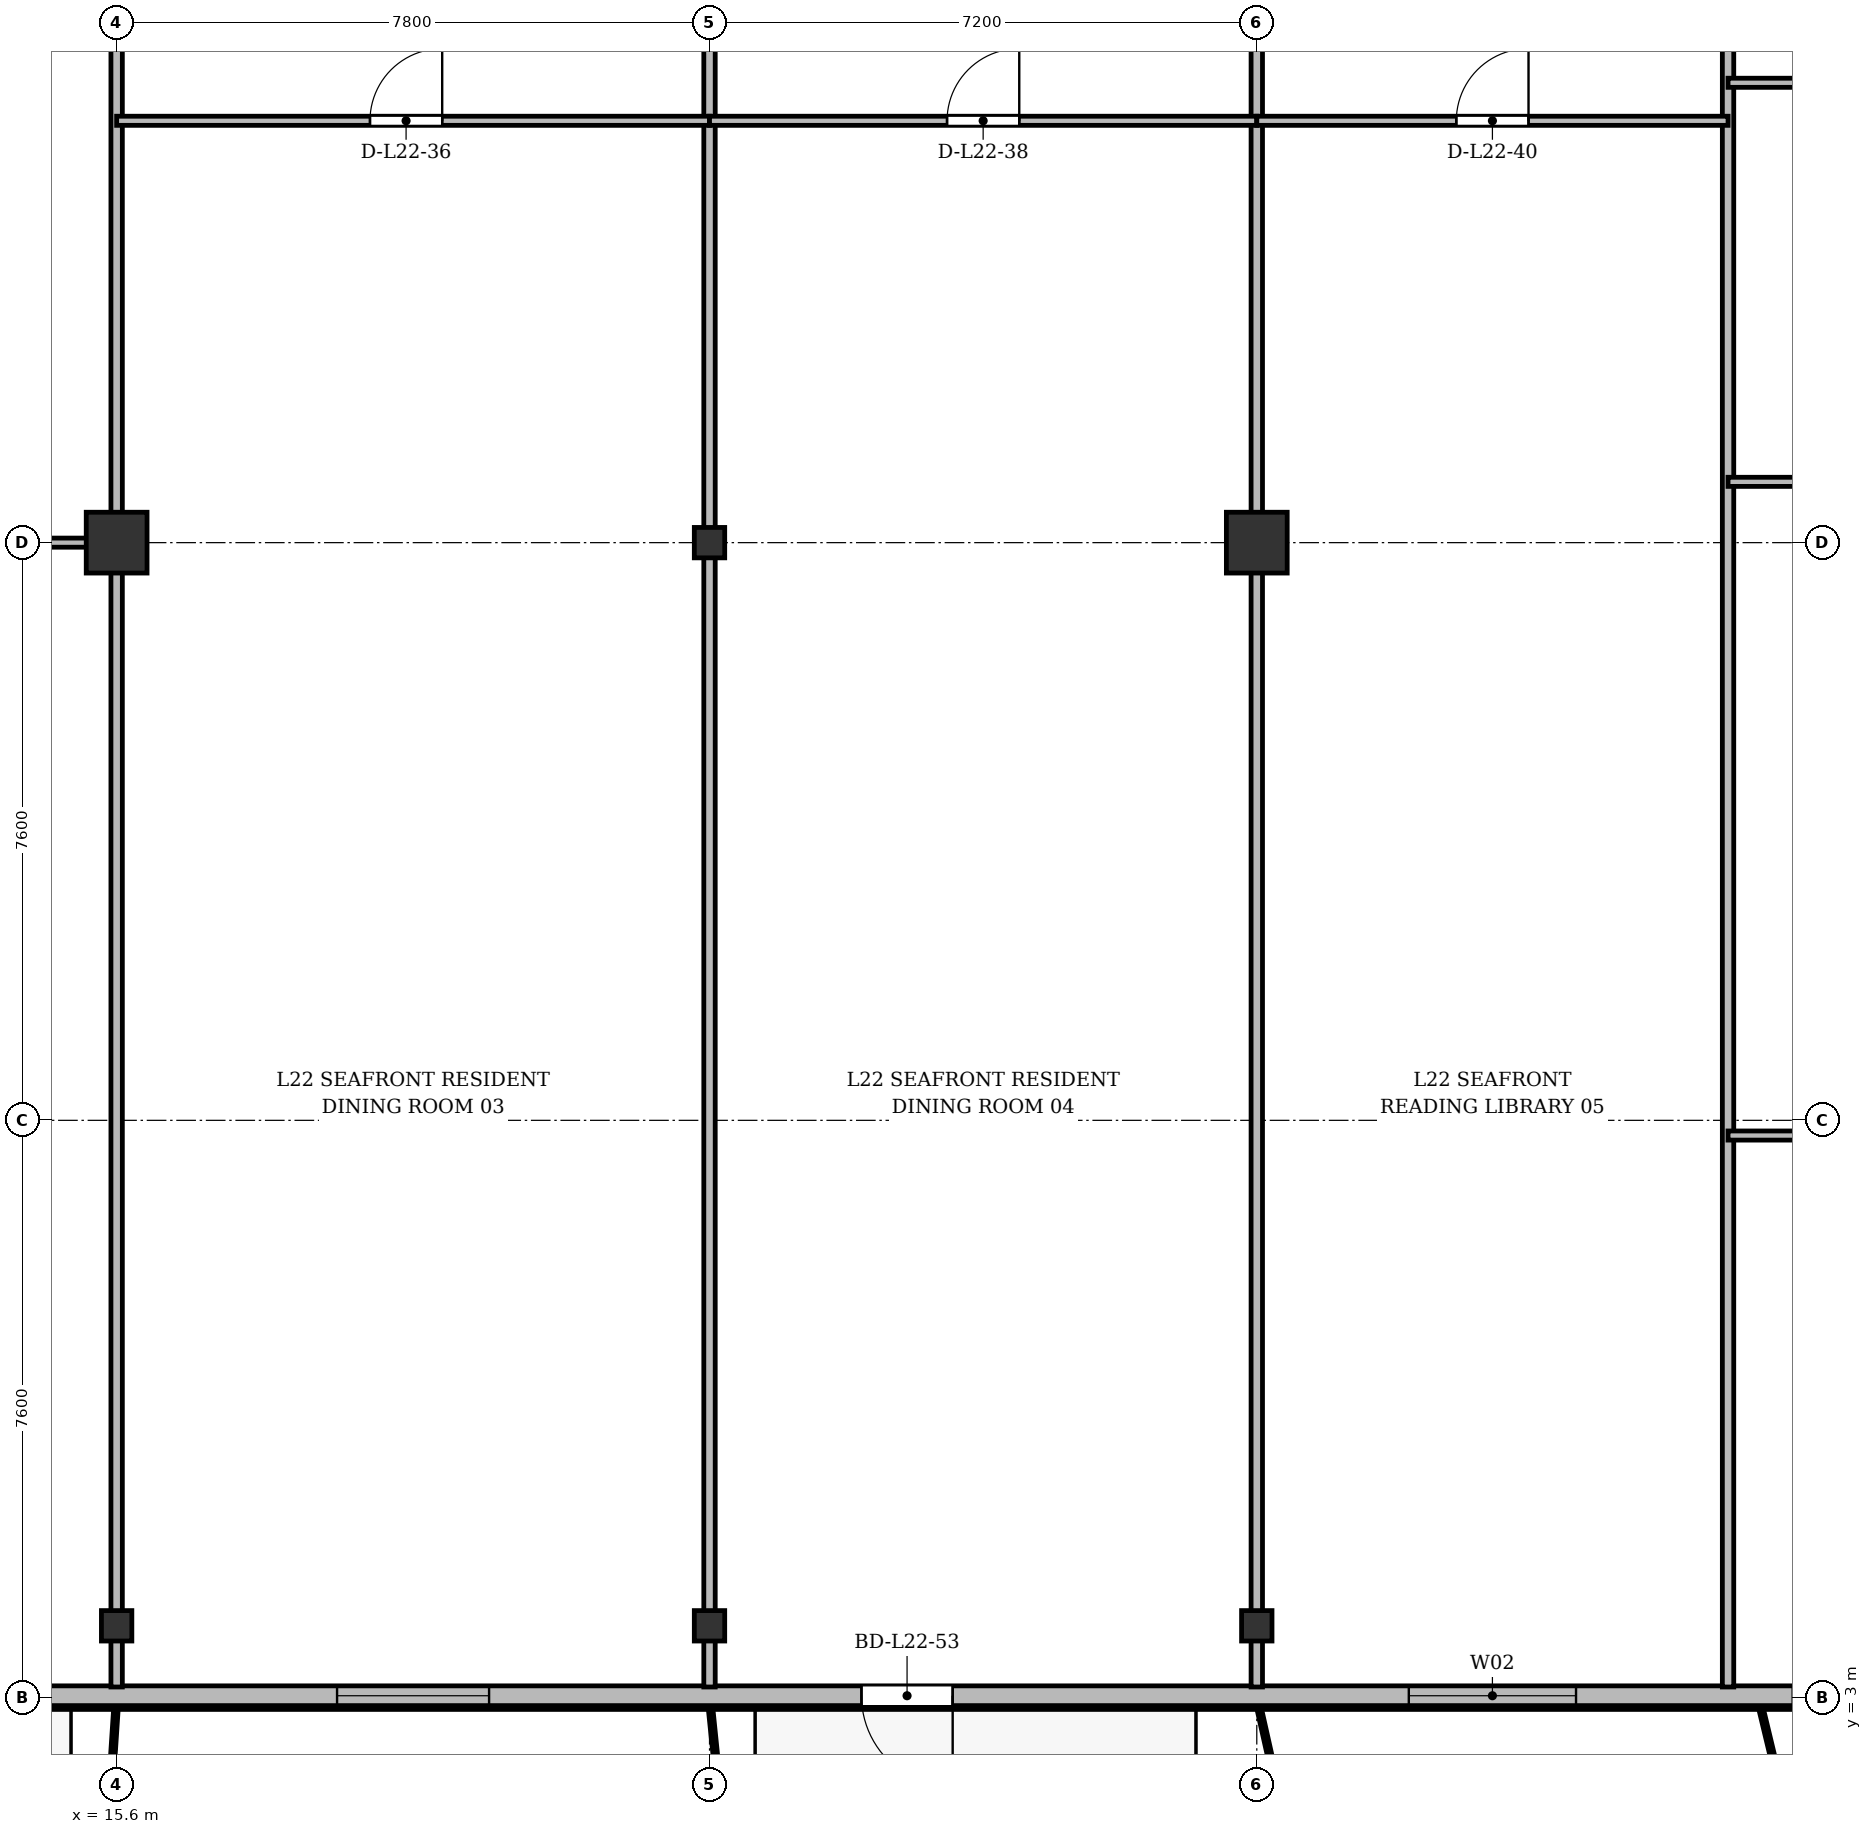
"""IFC4 building model, lengths in metres.
Left out: names, types, materials, properties, quantities, classifications, styles, units other than length and angle.
Written with IfcOpenShell. Run it as: python <this file> out.ifc"""

import sys

from ifc_helpers import new_model, si_unit, direction, frame, frame_2d, origin, origin_2d, place, context, subcontext, project, spatial, rectangle, i_section, extrude, source, transform, mapped, element, fill, save


model = new_model("IFC4")
c1 = context("Model", 3, precision=1e-05, world=origin(), true_north=direction((0.0, 1.0)))
c2 = subcontext(c1, "Body", "Model", "MODEL_VIEW")
j1 = project(units=[si_unit("LENGTHUNIT", "METRE"), si_unit("PLANEANGLEUNIT", "RADIAN")], contexts=[c1])
p1 = place(None, origin())
s1 = spatial("IfcSite", under=j1, at=p1, CompositionType="ELEMENT")
p2 = place(p1, origin())
s2 = spatial("IfcBuilding", under=s1, at=p2, CompositionType="ELEMENT")
p3 = place(p2, frame((0.0, 0.0, 88.9)))
s3 = spatial("IfcBuildingStorey", under=s2, at=p3, CompositionType="ELEMENT", Elevation=88.9)
m1 = source(origin(), c2, "Body", "SweptSolid", [
    extrude(i_section(OverallWidth=0.4, OverallDepth=0.4, WebThickness=0.022, FlangeThickness=0.035, at=origin_2d()), origin(), (0.0, 0.0, 1.0), 3.6),
])
p4 = place(p3, frame((15.6, 3.95, 0.0), z_axis=(0.0, 0.0, 1.0), x_axis=(1.0, 0.0, 0.0)))
e1 = element("IfcColumn", 1, at=p4, inside=s3, PredefinedType="COLUMN", context=c2, shape_type="MappedRepresentation", body=[
    mapped(m1, transform((0.0, 0.0, 0.0), x_axis=(1.0, 0.0, 0.0), y_axis=(0.0, 1.0, 0.0), z_axis=(0.0, 0.0, 1.0), scale=1.0)),
])
m2 = source(origin(), c2, "Body", "SweptSolid", [
    extrude(rectangle(XDim=0.8, YDim=0.8, at=origin_2d()), origin(), (0.0, 0.0, 1.0), 3.6),
])
p5 = place(p3, frame((15.6, 18.2, 0.0), z_axis=(0.0, 0.0, 1.0), x_axis=(1.0, 0.0, 0.0)))
e2 = element("IfcColumn", 2, at=p5, inside=s3, PredefinedType="COLUMN", context=c2, shape_type="MappedRepresentation", body=[
    mapped(m2, transform((0.0, 0.0, 0.0), x_axis=(1.0, 0.0, 0.0), y_axis=(0.0, 1.0, 0.0), z_axis=(0.0, 0.0, 1.0), scale=1.0)),
])
for number, where, z_axis, x_axis in (
    (3, (23.4, 3.95, 0.0), (0.0, 0.0, 1.0), (1.0, 0.0, 0.0)),
    (4, (23.4, 18.2, 0.0), (0.0, 0.0, 1.0), (1.0, 0.0, 0.0)),
    (5, (30.6, 3.95, 0.0), (0.0, 0.0, 1.0), (1.0, 0.0, 0.0)),
):
    element("IfcColumn", number, at=place(p3, frame(where, z_axis=z_axis, x_axis=x_axis)), inside=s3, PredefinedType="COLUMN", context=c2, shape_type="MappedRepresentation", body=[
        mapped(m1, transform((0.0, 0.0, 0.0), x_axis=(1.0, 0.0, 0.0), y_axis=(0.0, 1.0, 0.0), z_axis=(0.0, 0.0, 1.0), scale=1.0)),
    ])
p6 = place(p3, frame((30.6, 18.2, 0.0), z_axis=(0.0, 0.0, 1.0), x_axis=(1.0, 0.0, 0.0)))
e6 = element("IfcColumn", 6, at=p6, inside=s3, PredefinedType="COLUMN", context=c2, shape_type="MappedRepresentation", body=[
    mapped(m2, transform((0.0, 0.0, 0.0), x_axis=(1.0, 0.0, 0.0), y_axis=(0.0, 1.0, 0.0), z_axis=(0.0, 0.0, 1.0), scale=1.0)),
])
p7 = place(p3, frame((66.9, 3.03, 0.0), z_axis=(0.0, 0.0, 1.0), x_axis=(-1.0, 0.0, 0.0)))
e7 = element("IfcWall", 7, at=p7, inside=s3, PredefinedType="SOLIDWALL", context=c2, shape_type="SweptSolid", body=[
    extrude(rectangle(XDim=59.4, YDim=0.26, at=frame_2d((29.7, 0.0))), origin(), (0.0, 0.0, 1.0), 3.34),
])
p8 = place(p7, frame((0.945, 0.0, 0.9)))
e8 = element("IfcOpeningElement", 8, at=p8, cuts=e7, PredefinedType="OPENING", context=c2, shape_type="SweptSolid", body=[
    extrude(rectangle(XDim=1.5, YDim=1.75, at=frame_2d((0.75, 0.875))), frame((0.0, 0.14, 0.0), z_axis=(0.0, -1.0, 0.0), x_axis=(1.0, 0.0, 0.0)), (0.0, 0.0, 1.0), 0.28),
])
p9 = place(p7, frame((4.7, 0.0, 0.9)))
e9 = element("IfcOpeningElement", 9, at=p9, cuts=e7, PredefinedType="OPENING", context=c2, shape_type="SweptSolid", body=[
    extrude(rectangle(XDim=2.0, YDim=1.95, at=frame_2d((1.0, 0.975))), frame((0.0, 0.14, 0.0), z_axis=(0.0, -1.0, 0.0), x_axis=(1.0, 0.0, 0.0)), (0.0, 0.0, 1.0), 0.28),
])
p10 = place(p7, frame((9.18, 0.0, 0.0)))
e10 = element("IfcOpeningElement", 10, at=p10, cuts=e7, PredefinedType="OPENING", context=c2, shape_type="SweptSolid", body=[
    extrude(rectangle(XDim=1.2, YDim=2.2, at=frame_2d((0.6, 1.1))), frame((0.0, 0.14, 0.0), z_axis=(0.0, -1.0, 0.0), x_axis=(1.0, 0.0, 0.0)), (0.0, 0.0, 1.0), 0.28),
])
p11 = place(p7, frame((13.05, 0.0, 0.9)))
e11 = element("IfcOpeningElement", 11, at=p11, cuts=e7, PredefinedType="OPENING", context=c2, shape_type="SweptSolid", body=[
    extrude(rectangle(XDim=1.8, YDim=1.8, at=frame_2d((0.9, 0.9))), frame((0.0, 0.14, 0.0), z_axis=(0.0, -1.0, 0.0), x_axis=(1.0, 0.0, 0.0)), (0.0, 0.0, 1.0), 0.28),
])
p12 = place(p7, frame((16.35, 0.0, 0.9)))
e12 = element("IfcOpeningElement", 12, at=p12, cuts=e7, PredefinedType="OPENING", context=c2, shape_type="SweptSolid", body=[
    extrude(rectangle(XDim=1.5, YDim=1.75, at=frame_2d((0.75, 0.875))), frame((0.0, 0.14, 0.0), z_axis=(0.0, -1.0, 0.0), x_axis=(1.0, 0.0, 0.0)), (0.0, 0.0, 1.0), 0.28),
])
p13 = place(p7, frame((18.75, 0.0, 0.9)))
e13 = element("IfcOpeningElement", 13, at=p13, cuts=e7, PredefinedType="OPENING", context=c2, shape_type="SweptSolid", body=[
    extrude(rectangle(XDim=1.5, YDim=1.75, at=frame_2d((0.75, 0.875))), frame((0.0, 0.14, 0.0), z_axis=(0.0, -1.0, 0.0), x_axis=(1.0, 0.0, 0.0)), (0.0, 0.0, 1.0), 0.28),
])
p14 = place(p7, frame((20.9, 0.0, 0.9)))
e14 = element("IfcOpeningElement", 14, at=p14, cuts=e7, PredefinedType="OPENING", context=c2, shape_type="SweptSolid", body=[
    extrude(rectangle(XDim=2.0, YDim=1.95, at=frame_2d((1.0, 0.975))), frame((0.0, 0.14, 0.0), z_axis=(0.0, -1.0, 0.0), x_axis=(1.0, 0.0, 0.0)), (0.0, 0.0, 1.0), 0.28),
])
p15 = place(p7, frame((24.025, 0.0, 0.9)))
e15 = element("IfcOpeningElement", 15, at=p15, cuts=e7, PredefinedType="OPENING", context=c2, shape_type="SweptSolid", body=[
    extrude(rectangle(XDim=1.65, YDim=1.85, at=frame_2d((0.825, 0.925))), frame((0.0, 0.14, 0.0), z_axis=(0.0, -1.0, 0.0), x_axis=(1.0, 0.0, 0.0)), (0.0, 0.0, 1.0), 0.28),
])
p16 = place(p7, frame((27.45, 0.0, 0.9)))
e16 = element("IfcOpeningElement", 16, at=p16, cuts=e7, PredefinedType="OPENING", context=c2, shape_type="SweptSolid", body=[
    extrude(rectangle(XDim=1.8, YDim=1.8, at=frame_2d((0.9, 0.9))), frame((0.0, 0.14, 0.0), z_axis=(0.0, -1.0, 0.0), x_axis=(1.0, 0.0, 0.0)), (0.0, 0.0, 1.0), 0.28),
])
p17 = place(p7, frame((32.1, 0.0, 0.9)))
e17 = element("IfcOpeningElement", 17, at=p17, cuts=e7, PredefinedType="OPENING", context=c2, shape_type="SweptSolid", body=[
    extrude(rectangle(XDim=2.2, YDim=1.8, at=frame_2d((1.1, 0.9))), frame((0.0, 0.14, 0.0), z_axis=(0.0, -1.0, 0.0), x_axis=(1.0, 0.0, 0.0)), (0.0, 0.0, 1.0), 0.28),
])
p18 = place(p7, frame((40.301, 0.0, 0.0)))
e18 = element("IfcOpeningElement", 18, at=p18, cuts=e7, PredefinedType="OPENING", context=c2, shape_type="SweptSolid", body=[
    extrude(rectangle(XDim=1.2, YDim=2.2, at=frame_2d((0.6, 1.1))), frame((0.0, 0.14, 0.0), z_axis=(0.0, -1.0, 0.0), x_axis=(1.0, 0.0, 0.0)), (0.0, 0.0, 1.0), 0.28),
])
p19 = place(p7, frame((46.4, 0.0, 0.9)))
e19 = element("IfcOpeningElement", 19, at=p19, cuts=e7, PredefinedType="OPENING", context=c2, shape_type="SweptSolid", body=[
    extrude(rectangle(XDim=2.0, YDim=1.95, at=frame_2d((1.0, 0.975))), frame((0.0, 0.14, 0.0), z_axis=(0.0, -1.0, 0.0), x_axis=(1.0, 0.0, 0.0)), (0.0, 0.0, 1.0), 0.28),
])
p20 = place(p7, frame((54.558, 0.0, 0.0)))
e20 = element("IfcOpeningElement", 20, at=p20, cuts=e7, PredefinedType="OPENING", context=c2, shape_type="SweptSolid", body=[
    extrude(rectangle(XDim=1.2, YDim=2.2, at=frame_2d((0.6, 1.1))), frame((0.0, 0.14, 0.0), z_axis=(0.0, -1.0, 0.0), x_axis=(1.0, 0.0, 0.0)), (0.0, 0.0, 1.0), 0.28),
])
p21 = place(p7, frame((56.905, 0.0, 0.9)))
e21 = element("IfcOpeningElement", 21, at=p21, cuts=e7, PredefinedType="OPENING", context=c2, shape_type="SweptSolid", body=[
    extrude(rectangle(XDim=1.8, YDim=1.8, at=frame_2d((0.9, 0.9))), frame((0.0, 0.14, 0.0), z_axis=(0.0, -1.0, 0.0), x_axis=(1.0, 0.0, 0.0)), (0.0, 0.0, 1.0), 0.28),
])
for number, where, z_axis, x_axis in (
    (22, (15.6, 3.145, 0.0), (0.0, 0.0, 1.0), (0.0, 1.0, 0.0)),
    (23, (23.4, 3.145, 0.0), (0.0, 0.0, 1.0), (0.0, 1.0, 0.0)),
    (24, (30.6, 3.145, 0.0), (0.0, 0.0, 1.0), (0.0, 1.0, 0.0)),
):
    element("IfcWall", number, at=place(p3, frame(where, z_axis=z_axis, x_axis=x_axis)), inside=s3, PredefinedType="PARTITIONING", context=c2, shape_type="SweptSolid", body=[
        extrude(rectangle(XDim=24.455, YDim=0.15, at=frame_2d((12.228, 0.0))), origin(), (0.0, 0.0, 1.0), 2.84),
    ])
p22 = place(p3, frame((36.8, 3.145, 0.0), z_axis=(0.0, 0.0, 1.0), x_axis=(0.0, 1.0, 0.0)))
e25 = element("IfcWall", 25, at=p22, inside=s3, PredefinedType="PARTITIONING", context=c2, shape_type="SweptSolid", body=[
    extrude(rectangle(XDim=24.455, YDim=0.15, at=frame_2d((12.228, 0.0))), origin(), (0.0, 0.0, 1.0), 2.752),
])
p23 = place(p3, frame((10.6, 18.2, 0.0), z_axis=(0.0, 0.0, 1.0), x_axis=(1.0, 0.0, 0.0)))
e26 = element("IfcWall", 26, at=p23, inside=s3, PredefinedType="PARTITIONING", context=c2, shape_type="SweptSolid", body=[
    extrude(rectangle(XDim=5.0, YDim=0.12, at=frame_2d((2.5, 0.0))), origin(), (0.0, 0.0, 1.0), 2.752),
])
p24 = place(p23, frame((2.025, 0.0, 0.0)))
e27 = element("IfcOpeningElement", 27, at=p24, cuts=e26, PredefinedType="OPENING", context=c2, shape_type="SweptSolid", body=[
    extrude(rectangle(XDim=0.95, YDim=2.15, at=frame_2d((0.475, 1.075))), frame((0.0, 0.07, 0.0), z_axis=(0.0, -1.0, 0.0), x_axis=(1.0, 0.0, 0.0)), (0.0, 0.0, 1.0), 0.14),
])
p25 = place(p3, frame((15.6, 23.75, 0.0), z_axis=(0.0, 0.0, 1.0), x_axis=(1.0, 0.0, 0.0)))
e28 = element("IfcWall", 28, at=p25, inside=s3, PredefinedType="PARTITIONING", context=c2, shape_type="SweptSolid", body=[
    extrude(rectangle(XDim=7.8, YDim=0.12, at=frame_2d((3.9, 0.0))), origin(), (0.0, 0.0, 1.0), 2.84),
])
p26 = place(p25, frame((3.333, 0.0, 0.0)))
e29 = element("IfcOpeningElement", 29, at=p26, cuts=e28, PredefinedType="OPENING", context=c2, shape_type="SweptSolid", body=[
    extrude(rectangle(XDim=0.95, YDim=2.15, at=frame_2d((0.475, 1.075))), frame((0.0, 0.07, 0.0), z_axis=(0.0, -1.0, 0.0), x_axis=(1.0, 0.0, 0.0)), (0.0, 0.0, 1.0), 0.14),
])
p27 = place(p3, frame((23.4, 23.75, 0.0), z_axis=(0.0, 0.0, 1.0), x_axis=(1.0, 0.0, 0.0)))
e30 = element("IfcWall", 30, at=p27, inside=s3, PredefinedType="PARTITIONING", context=c2, shape_type="SweptSolid", body=[
    extrude(rectangle(XDim=7.2, YDim=0.12, at=frame_2d((3.6, 0.0))), origin(), (0.0, 0.0, 1.0), 2.84),
])
p28 = place(p27, frame((3.125, 0.0, 0.0)))
e31 = element("IfcOpeningElement", 31, at=p28, cuts=e30, PredefinedType="OPENING", context=c2, shape_type="SweptSolid", body=[
    extrude(rectangle(XDim=0.95, YDim=2.15, at=frame_2d((0.475, 1.075))), frame((0.0, 0.07, 0.0), z_axis=(0.0, -1.0, 0.0), x_axis=(1.0, 0.0, 0.0)), (0.0, 0.0, 1.0), 0.14),
])
p29 = place(p3, frame((30.6, 23.75, 0.0), z_axis=(0.0, 0.0, 1.0), x_axis=(1.0, 0.0, 0.0)))
e32 = element("IfcWall", 32, at=p29, inside=s3, PredefinedType="PARTITIONING", context=c2, shape_type="SweptSolid", body=[
    extrude(rectangle(XDim=6.2, YDim=0.12, at=frame_2d((3.1, 0.0))), origin(), (0.0, 0.0, 1.0), 2.84),
])
p30 = place(p29, frame((2.625, 0.0, 0.0)))
e33 = element("IfcOpeningElement", 33, at=p30, cuts=e32, PredefinedType="OPENING", context=c2, shape_type="SweptSolid", body=[
    extrude(rectangle(XDim=0.95, YDim=2.15, at=frame_2d((0.475, 1.075))), frame((0.0, 0.07, 0.0), z_axis=(0.0, -1.0, 0.0), x_axis=(1.0, 0.0, 0.0)), (0.0, 0.0, 1.0), 0.14),
])
p31 = place(p3, frame((36.8, 19.0, 0.0), z_axis=(0.0, 0.0, 1.0), x_axis=(1.0, 0.0, 0.0)))
e34 = element("IfcWall", 34, at=p31, inside=s3, PredefinedType="PARTITIONING", context=c2, shape_type="SweptSolid", body=[
    extrude(rectangle(XDim=7.0, YDim=0.12, at=frame_2d((3.5, 0.0))), origin(), (0.0, 0.0, 1.0), 2.84),
])
p32 = place(p31, frame((2.934, 0.0, 0.0)))
e35 = element("IfcOpeningElement", 35, at=p32, cuts=e34, PredefinedType="OPENING", context=c2, shape_type="SweptSolid", body=[
    extrude(rectangle(XDim=0.95, YDim=2.15, at=frame_2d((0.475, 1.075))), frame((0.0, 0.07, 0.0), z_axis=(0.0, -1.0, 0.0), x_axis=(1.0, 0.0, 0.0)), (0.0, 0.0, 1.0), 0.14),
])
p33 = place(p3, frame((36.8, 24.25, 0.0), z_axis=(0.0, 0.0, 1.0), x_axis=(1.0, 0.0, 0.0)))
e36 = element("IfcWall", 36, at=p33, inside=s3, PredefinedType="PARTITIONING", context=c2, shape_type="SweptSolid", body=[
    extrude(rectangle(XDim=2.4, YDim=0.12, at=frame_2d((1.2, 0.0))), origin(), (0.0, 0.0, 1.0), 3.34),
])
p34 = place(p3, frame((36.8, 10.4, 0.0), z_axis=(0.0, 0.0, 1.0), x_axis=(1.0, 0.0, 0.0)))
e37 = element("IfcWall", 37, at=p34, inside=s3, PredefinedType="PARTITIONING", context=c2, shape_type="SweptSolid", body=[
    extrude(rectangle(XDim=3.5, YDim=0.12, at=frame_2d((1.75, 0.0))), origin(), (0.0, 0.0, 1.0), 3.34),
])
p35 = place(p34, frame((1.176, 0.0, 0.0)))
e38 = element("IfcOpeningElement", 38, at=p35, cuts=e37, PredefinedType="OPENING", context=c2, shape_type="SweptSolid", body=[
    extrude(rectangle(XDim=0.95, YDim=2.15, at=frame_2d((0.475, 1.075))), frame((0.0, 0.07, 0.0), z_axis=(0.0, -1.0, 0.0), x_axis=(1.0, 0.0, 0.0)), (0.0, 0.0, 1.0), 0.14),
])
m3 = source(origin(), c2, "Body", "SweptSolid", [
    extrude(rectangle(XDim=2.2, YDim=1.8, at=frame_2d((1.1, 0.9))), frame((0.0, 0.03, 0.0), z_axis=(0.0, -1.0, 0.0), x_axis=(1.0, 0.0, 0.0)), (0.0, 0.0, 1.0), 0.06),
])
p36 = place(p17, origin())
e39 = element("IfcWindow", 39, at=p36, inside=s3, PartitioningType="SINGLE_PANEL", PredefinedType="WINDOW", context=c2, shape_type="MappedRepresentation", body=[
    mapped(m3, transform((0.0, 0.0, 0.0), x_axis=(1.0, 0.0, 0.0), y_axis=(0.0, 1.0, 0.0), z_axis=(0.0, 0.0, 1.0), scale=1.0)),
])
fill(e17, e39)
m4 = source(origin(), c2, "Body", "SweptSolid", [
    extrude(rectangle(XDim=1.2, YDim=2.2, at=frame_2d((0.6, 1.1))), frame((0.0, 0.025, 0.0), z_axis=(0.0, -1.0, 0.0), x_axis=(1.0, 0.0, 0.0)), (0.0, 0.0, 1.0), 0.05),
])
p37 = place(p18, origin())
e40 = element("IfcDoor", 40, at=p37, inside=s3, OperationType="SINGLE_SWING_LEFT", PredefinedType="DOOR", context=c2, shape_type="MappedRepresentation", body=[
    mapped(m4, transform((0.0, 0.0, 0.0), x_axis=(1.0, 0.0, 0.0), y_axis=(0.0, 1.0, 0.0), z_axis=(0.0, 0.0, 1.0), scale=1.0)),
])
fill(e18, e40)
m5 = source(origin(), c2, "Body", "SweptSolid", [
    extrude(rectangle(XDim=2.0, YDim=1.95, at=frame_2d((1.0, 0.975))), frame((0.0, 0.03, 0.0), z_axis=(0.0, -1.0, 0.0), x_axis=(1.0, 0.0, 0.0)), (0.0, 0.0, 1.0), 0.06),
])
p38 = place(p19, origin())
e41 = element("IfcWindow", 41, at=p38, inside=s3, PartitioningType="SINGLE_PANEL", PredefinedType="WINDOW", context=c2, shape_type="MappedRepresentation", body=[
    mapped(m5, transform((0.0, 0.0, 0.0), x_axis=(1.0, 0.0, 0.0), y_axis=(0.0, 1.0, 0.0), z_axis=(0.0, 0.0, 1.0), scale=1.0)),
])
fill(e19, e41)
m6 = source(origin(), c2, "Body", "SweptSolid", [
    extrude(rectangle(XDim=0.95, YDim=2.15, at=frame_2d((0.475, 1.075))), frame((0.0, 0.025, 0.0), z_axis=(0.0, -1.0, 0.0), x_axis=(1.0, 0.0, 0.0)), (0.0, 0.0, 1.0), 0.05),
])
p39 = place(p26, origin())
e42 = element("IfcDoor", 42, at=p39, inside=s3, OperationType="SINGLE_SWING_RIGHT", PredefinedType="DOOR", context=c2, shape_type="MappedRepresentation", body=[
    mapped(m6, transform((0.0, 0.0, 0.0), x_axis=(1.0, 0.0, 0.0), y_axis=(0.0, 1.0, 0.0), z_axis=(0.0, 0.0, 1.0), scale=1.0)),
])
fill(e29, e42)
p40 = place(p28, origin())
e43 = element("IfcDoor", 43, at=p40, inside=s3, OperationType="SINGLE_SWING_RIGHT", PredefinedType="DOOR", context=c2, shape_type="MappedRepresentation", body=[
    mapped(m6, transform((0.0, 0.0, 0.0), x_axis=(1.0, 0.0, 0.0), y_axis=(0.0, 1.0, 0.0), z_axis=(0.0, 0.0, 1.0), scale=1.0)),
])
fill(e31, e43)
p41 = place(p30, origin())
e44 = element("IfcDoor", 44, at=p41, inside=s3, OperationType="SINGLE_SWING_RIGHT", PredefinedType="DOOR", context=c2, shape_type="MappedRepresentation", body=[
    mapped(m6, transform((0.0, 0.0, 0.0), x_axis=(1.0, 0.0, 0.0), y_axis=(0.0, 1.0, 0.0), z_axis=(0.0, 0.0, 1.0), scale=1.0)),
])
fill(e33, e44)
save(model, sys.argv[1])
